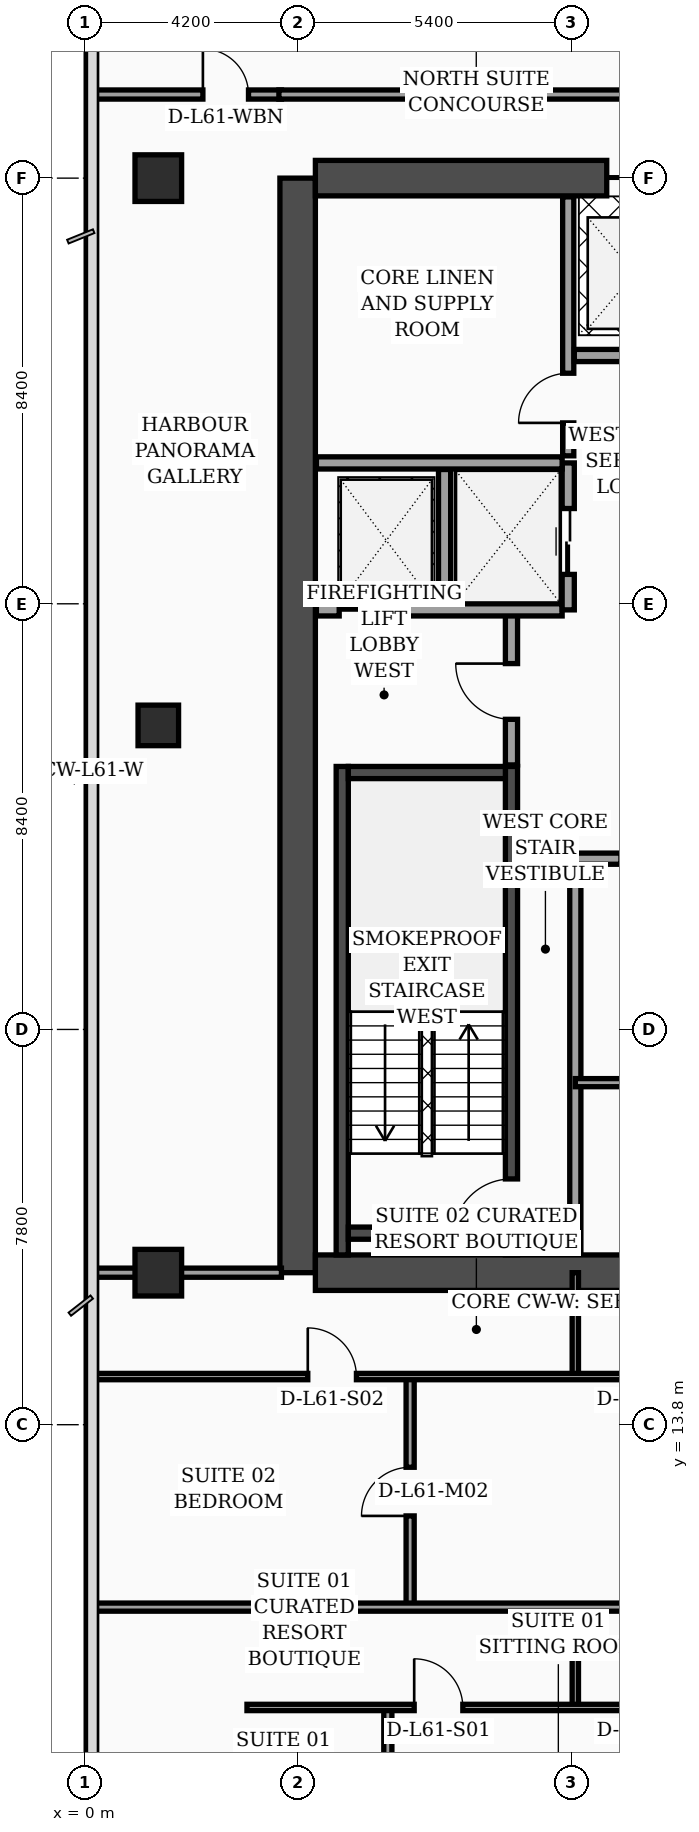
"""IFC4 building model, lengths in metres.
Left out: names, types, materials, properties, quantities, classifications, styles, units other than length and angle.
Written with IfcOpenShell. Run it as: python <this file> out.ifc"""

import sys

from ifc_helpers import new_model, si_unit, direction, frame, frame_2d, origin, origin_2d, place, context, subcontext, project, spatial, rectangle, extrude, element, fill, save


model = new_model("IFC4")
c1 = context("Model", 3, precision=1e-05, world=origin(), true_north=direction((0.0, 1.0)))
c2 = subcontext(c1, "Body", "Model", "MODEL_VIEW")
j1 = project(units=[si_unit("LENGTHUNIT", "METRE"), si_unit("PLANEANGLEUNIT", "RADIAN")], contexts=[c1])
p1 = place(None, origin())
s1 = spatial("IfcSite", under=j1, at=p1, CompositionType="ELEMENT")
p2 = place(p1, origin())
s2 = spatial("IfcBuilding", under=s1, at=p2, CompositionType="ELEMENT")
p3 = place(p2, frame((0.0, 0.0, 247.6)))
s3 = spatial("IfcBuildingStorey", under=s2, at=p3, CompositionType="ELEMENT", Elevation=247.6)
p4 = place(p3, frame((4.2, 16.8, 0.0), z_axis=(0.0, 0.0, 1.0), x_axis=(0.0, 1.0, 0.0)))
e1 = element("IfcWall", 1, at=p4, inside=s3, PredefinedType="SHEAR", context=c2, shape_type="SweptSolid", body=[
    extrude(rectangle(XDim=21.6, YDim=0.7, at=frame_2d((10.8, 0.0))), origin(), (0.0, 0.0, 1.0), 3.56),
])
p5 = place(p3, frame((4.55, 38.4, 0.0), z_axis=(0.0, 0.0, 1.0), x_axis=(1.0, 0.0, 0.0)))
e2 = element("IfcWall", 2, at=p5, inside=s3, PredefinedType="SHEAR", context=c2, shape_type="SweptSolid", body=[
    extrude(rectangle(XDim=10.1, YDim=0.7, at=frame_2d((5.05, 0.0))), origin(), (0.0, 0.0, 1.0), 3.56),
])
p6 = place(p5, frame((5.75, 0.0, 0.0)))
e3 = element("IfcOpeningElement", 3, at=p6, cuts=e2, PredefinedType="OPENING", context=c2, shape_type="SweptSolid", body=[
    extrude(rectangle(XDim=1.1, YDim=2.2, at=frame_2d((0.55, 1.1))), frame((0.0, 0.36, 0.0), z_axis=(0.0, -1.0, 0.0), x_axis=(1.0, 0.0, 0.0)), (0.0, 0.0, 1.0), 0.72),
])
p7 = place(p3, frame((4.55, 16.8, 0.0), z_axis=(0.0, 0.0, 1.0), x_axis=(1.0, 0.0, 0.0)))
e4 = element("IfcWall", 4, at=p7, inside=s3, PredefinedType="SHEAR", context=c2, shape_type="SweptSolid", body=[
    extrude(rectangle(XDim=10.1, YDim=0.7, at=frame_2d((5.05, 0.0))), origin(), (0.0, 0.0, 1.0), 3.56),
])
p8 = place(p3, frame((5.08, 17.15, 0.0), z_axis=(0.0, 0.0, 1.0), x_axis=(0.0, 1.0, 0.0)))
e5 = element("IfcWall", 5, at=p8, inside=s3, PredefinedType="SOLIDWALL", context=c2, shape_type="SweptSolid", body=[
    extrude(rectangle(XDim=9.64, YDim=0.24, at=frame_2d((4.82, 0.0))), origin(), (0.0, 0.0, 1.0), 3.56),
])
p9 = place(p3, frame((8.42, 17.15, 0.0), z_axis=(0.0, 0.0, 1.0), x_axis=(0.0, 1.0, 0.0)))
e6 = element("IfcWall", 6, at=p9, inside=s3, PredefinedType="SOLIDWALL", context=c2, shape_type="SweptSolid", body=[
    extrude(rectangle(XDim=9.64, YDim=0.24, at=frame_2d((4.82, 0.0))), origin(), (0.0, 0.0, 1.0), 3.56),
])
p10 = place(p9, frame((0.35, 0.0, 0.0)))
e7 = element("IfcOpeningElement", 7, at=p10, cuts=e6, PredefinedType="OPENING", context=c2, shape_type="SweptSolid", body=[
    extrude(rectangle(XDim=1.15, YDim=2.2, at=frame_2d((0.575, 1.1))), frame((0.0, 0.13, 0.0), z_axis=(0.0, -1.0, 0.0), x_axis=(1.0, 0.0, 0.0)), (0.0, 0.0, 1.0), 0.26),
])
for number, where, z_axis, x_axis in (
    (8, (5.2, 17.58, 0.0), (0.0, 0.0, 1.0), (1.0, 0.0, 0.0)),
    (9, (5.2, 26.67, 0.0), (0.0, 0.0, 1.0), (1.0, 0.0, 0.0)),
):
    element("IfcWall", number, at=place(p3, frame(where, z_axis=z_axis, x_axis=x_axis)), inside=s3, PredefinedType="SOLIDWALL", context=c2, shape_type="SweptSolid", body=[
        extrude(rectangle(XDim=3.1, YDim=0.24, at=frame_2d((1.55, 0.0))), origin(), (0.0, 0.0, 1.0), 3.56),
    ])
p11 = place(p3, frame((1.45, 16.8, 0.0), z_axis=(0.0, 0.0, 1.0), x_axis=(1.0, 0.0, 0.0)))
e10 = element("IfcColumn", 10, at=p11, inside=s3, PredefinedType="COLUMN", context=c2, shape_type="SweptSolid", body=[
    extrude(rectangle(XDim=0.92, YDim=0.92, at=origin_2d()), origin(), (0.0, 0.0, 1.0), 3.56),
])
p12 = place(p3, frame((1.45, 27.6, 0.0), z_axis=(0.0, 0.0, 1.0), x_axis=(1.0, 0.0, 0.0)))
e11 = element("IfcColumn", 11, at=p12, inside=s3, PredefinedType="COLUMN", context=c2, shape_type="SweptSolid", body=[
    extrude(rectangle(XDim=0.8, YDim=0.8, at=origin_2d()), origin(), (0.0, 0.0, 1.0), 3.56),
])
p13 = place(p3, frame((1.45, 38.4, 0.0), z_axis=(0.0, 0.0, 1.0), x_axis=(1.0, 0.0, 0.0)))
e12 = element("IfcColumn", 12, at=p13, inside=s3, PredefinedType="COLUMN", context=c2, shape_type="SweptSolid", body=[
    extrude(rectangle(XDim=0.92, YDim=0.92, at=origin_2d()), origin(), (0.0, 0.0, 1.0), 3.56),
])
p14 = place(p3, frame((8.42, 26.82, 0.0), z_axis=(0.0, 0.0, 1.0), x_axis=(0.0, 1.0, 0.0)))
e13 = element("IfcWall", 13, at=p14, inside=s3, PredefinedType="SOLIDWALL", context=c2, shape_type="SweptSolid", body=[
    extrude(rectangle(XDim=3.0, YDim=0.24, at=frame_2d((1.5, 0.0))), origin(), (0.0, 0.0, 1.0), 3.56),
])
p15 = place(p14, frame((0.9, 0.0, 0.0)))
e14 = element("IfcOpeningElement", 14, at=p15, cuts=e13, PredefinedType="OPENING", context=c2, shape_type="SweptSolid", body=[
    extrude(rectangle(XDim=1.1, YDim=2.2, at=frame_2d((0.55, 1.1))), frame((0.0, 0.13, 0.0), z_axis=(0.0, -1.0, 0.0), x_axis=(1.0, 0.0, 0.0)), (0.0, 0.0, 1.0), 0.26),
])
p16 = place(p3, frame((4.57, 29.88, 0.0), z_axis=(0.0, 0.0, 1.0), x_axis=(1.0, 0.0, 0.0)))
e15 = element("IfcWall", 15, at=p16, inside=s3, PredefinedType="SOLIDWALL", context=c2, shape_type="SweptSolid", body=[
    extrude(rectangle(XDim=4.85, YDim=0.24, at=frame_2d((2.425, 0.0))), origin(), (0.0, 0.0, 1.0), 3.56),
])
p17 = place(p16, frame((0.45, 0.0, 0.0)))
e16 = element("IfcOpeningElement", 16, at=p17, cuts=e15, PredefinedType="OPENING", context=c2, shape_type="SweptSolid", body=[
    extrude(rectangle(XDim=1.3, YDim=2.35, at=frame_2d((0.65, 1.175))), frame((0.0, 0.13, 0.0), z_axis=(0.0, -1.0, 0.0), x_axis=(1.0, 0.0, 0.0)), (0.0, 0.0, 1.0), 0.26),
])
p18 = place(p3, frame((7.1, 30.02, 0.0), z_axis=(0.0, 0.0, 1.0), x_axis=(0.0, 1.0, 0.0)))
e17 = element("IfcWall", 17, at=p18, inside=s3, PredefinedType="SOLIDWALL", context=c2, shape_type="SweptSolid", body=[
    extrude(rectangle(XDim=2.63, YDim=0.24, at=frame_2d((1.315, 0.0))), origin(), (0.0, 0.0, 1.0), 3.56),
])
p19 = place(p3, frame((9.54, 29.88, 0.0), z_axis=(0.0, 0.0, 1.0), x_axis=(0.0, 1.0, 0.0)))
e18 = element("IfcWall", 18, at=p19, inside=s3, PredefinedType="SOLIDWALL", context=c2, shape_type="SweptSolid", body=[
    extrude(rectangle(XDim=2.9, YDim=0.24, at=frame_2d((1.45, 0.0))), origin(), (0.0, 0.0, 1.0), 3.56),
])
p20 = place(p19, frame((0.7, 0.0, 0.0)))
e19 = element("IfcOpeningElement", 19, at=p20, cuts=e18, PredefinedType="OPENING", context=c2, shape_type="SweptSolid", body=[
    extrude(rectangle(XDim=1.3, YDim=2.35, at=frame_2d((0.65, 1.175))), frame((0.0, 0.13, 0.0), z_axis=(0.0, -1.0, 0.0), x_axis=(1.0, 0.0, 0.0)), (0.0, 0.0, 1.0), 0.26),
])
p21 = place(p3, frame((4.57, 32.78, 0.0), z_axis=(0.0, 0.0, 1.0), x_axis=(1.0, 0.0, 0.0)))
e20 = element("IfcWall", 20, at=p21, inside=s3, PredefinedType="SOLIDWALL", context=c2, shape_type="SweptSolid", body=[
    extrude(rectangle(XDim=4.85, YDim=0.24, at=frame_2d((2.425, 0.0))), origin(), (0.0, 0.0, 1.0), 3.19),
])
p22 = place(p3, frame((9.68, 17.17, 0.0), z_axis=(0.0, 0.0, 1.0), x_axis=(0.0, 1.0, 0.0)))
e21 = element("IfcWall", 21, at=p22, inside=s3, PredefinedType="SOLIDWALL", context=c2, shape_type="SweptSolid", body=[
    extrude(rectangle(XDim=7.83, YDim=0.22, at=frame_2d((3.915, 0.0))), origin(), (0.0, 0.0, 1.0), 3.56),
])
p23 = place(p3, frame((9.54, 32.92, 0.0), z_axis=(0.0, 0.0, 1.0), x_axis=(0.0, 1.0, 0.0)))
e22 = element("IfcWall", 22, at=p23, inside=s3, PredefinedType="SOLIDWALL", context=c2, shape_type="SweptSolid", body=[
    extrude(rectangle(XDim=5.11, YDim=0.22, at=frame_2d((2.555, 0.0))), origin(), (0.0, 0.0, 1.0), 3.56),
])
p24 = place(p23, frame((0.65, 0.0, 0.0)))
e23 = element("IfcOpeningElement", 23, at=p24, cuts=e22, PredefinedType="OPENING", context=c2, shape_type="SweptSolid", body=[
    extrude(rectangle(XDim=0.98, YDim=2.15, at=frame_2d((0.49, 1.075))), frame((0.0, 0.12, 0.0), z_axis=(0.0, -1.0, 0.0), x_axis=(1.0, 0.0, 0.0)), (0.0, 0.0, 1.0), 0.24),
])
p25 = place(p3, frame((9.68, 20.55, 0.0), z_axis=(0.0, 0.0, 1.0), x_axis=(1.0, 0.0, 0.0)))
e24 = element("IfcWall", 24, at=p25, inside=s3, PredefinedType="PARTITIONING", context=c2, shape_type="SweptSolid", body=[
    extrude(rectangle(XDim=4.95, YDim=0.16, at=frame_2d((2.475, 0.0))), origin(), (0.0, 0.0, 1.0), 3.56),
])
p26 = place(p25, frame((1.1, 0.0, 0.0)))
e25 = element("IfcOpeningElement", 25, at=p26, cuts=e24, PredefinedType="OPENING", context=c2, shape_type="SweptSolid", body=[
    extrude(rectangle(XDim=0.98, YDim=2.15, at=frame_2d((0.49, 1.075))), frame((0.0, 0.09, 0.0), z_axis=(0.0, -1.0, 0.0), x_axis=(1.0, 0.0, 0.0)), (0.0, 0.0, 1.0), 0.18),
])
p27 = place(p3, frame((9.68, 24.97, 0.0), z_axis=(0.0, 0.0, 1.0), x_axis=(1.0, 0.0, 0.0)))
e26 = element("IfcWall", 26, at=p27, inside=s3, PredefinedType="SOLIDWALL", context=c2, shape_type="SweptSolid", body=[
    extrude(rectangle(XDim=4.95, YDim=0.22, at=frame_2d((2.475, 0.0))), origin(), (0.0, 0.0, 1.0), 2.99),
])
p28 = place(p27, frame((0.9, 0.0, 0.0)))
e27 = element("IfcOpeningElement", 27, at=p28, cuts=e26, PredefinedType="OPENING", context=c2, shape_type="SweptSolid", body=[
    extrude(rectangle(XDim=0.98, YDim=2.15, at=frame_2d((0.49, 1.075))), frame((0.0, 0.12, 0.0), z_axis=(0.0, -1.0, 0.0), x_axis=(1.0, 0.0, 0.0)), (0.0, 0.0, 1.0), 0.24),
])
p29 = place(p3, frame((9.66, 34.9, 0.0), z_axis=(0.0, 0.0, 1.0), x_axis=(1.0, 0.0, 0.0)))
e28 = element("IfcWall", 28, at=p29, inside=s3, PredefinedType="SOLIDWALL", context=c2, shape_type="SweptSolid", body=[
    extrude(rectangle(XDim=4.97, YDim=0.24, at=frame_2d((2.485, 0.0))), origin(), (0.0, 0.0, 1.0), 3.56),
])
p30 = place(p3, frame((0.08, 16.8, 0.0), z_axis=(0.0, 0.0, 1.0), x_axis=(1.0, 0.0, 0.0)))
e29 = element("IfcWall", 29, at=p30, inside=s3, PredefinedType="PARTITIONING", context=c2, shape_type="SweptSolid", body=[
    extrude(rectangle(XDim=3.8, YDim=0.18, at=frame_2d((1.9, 0.0))), origin(), (0.0, 0.0, 1.0), 2.99),
])
p31 = place(p3, frame((0.08, 40.05, 0.0), z_axis=(0.0, 0.0, 1.0), x_axis=(1.0, 0.0, 0.0)))
e30 = element("IfcWall", 30, at=p31, inside=s3, PredefinedType="PARTITIONING", context=c2, shape_type="SweptSolid", body=[
    extrude(rectangle(XDim=3.8, YDim=0.18, at=frame_2d((1.9, 0.0))), origin(), (0.0, 0.0, 1.0), 2.99),
])
p32 = place(p31, frame((2.25, 0.0, 0.0)))
e31 = element("IfcOpeningElement", 31, at=p32, cuts=e30, PredefinedType="OPENING", context=c2, shape_type="SweptSolid", body=[
    extrude(rectangle(XDim=0.9, YDim=2.15, at=frame_2d((0.45, 1.075))), frame((0.0, 0.1, 0.0), z_axis=(0.0, -1.0, 0.0), x_axis=(1.0, 0.0, 0.0)), (0.0, 0.0, 1.0), 0.2),
])
p33 = place(p3, frame((9.68, 8.22, 0.0), z_axis=(0.0, 0.0, 1.0), x_axis=(0.0, 1.0, 0.0)))
e32 = element("IfcWall", 32, at=p33, inside=s3, PredefinedType="PARTITIONING", context=c2, shape_type="SweptSolid", body=[
    extrude(rectangle(XDim=1.98, YDim=0.125, at=frame_2d((0.99, 0.0))), origin(), (0.0, 0.0, 1.0), 3.09),
])
p34 = place(p3, frame((5.98, 2.44, 0.0), z_axis=(0.0, 0.0, 1.0), x_axis=(0.0, 1.0, 0.0)))
e33 = element("IfcWall", 33, at=p34, inside=s3, PredefinedType="PARTITIONING", context=c2, shape_type="SweptSolid", body=[
    extrude(rectangle(XDim=5.78, YDim=0.16, at=frame_2d((2.89, 0.0))), origin(), (0.0, 0.0, 1.0), 3.09),
])
p35 = place(p34, frame((2.41, 0.0, 0.0)))
e34 = element("IfcOpeningElement", 34, at=p35, cuts=e33, PredefinedType="OPENING", context=c2, shape_type="SweptSolid", body=[
    extrude(rectangle(XDim=0.96, YDim=2.2, at=frame_2d((0.48, 1.1))), frame((0.0, 0.09, 0.0), z_axis=(0.0, -1.0, 0.0), x_axis=(1.0, 0.0, 0.0)), (0.0, 0.0, 1.0), 0.18),
])
p36 = place(p3, frame((3.2, 8.22, 0.0), z_axis=(0.0, 0.0, 1.0), x_axis=(1.0, 0.0, 0.0)))
e35 = element("IfcWall", 35, at=p36, inside=s3, PredefinedType="PARTITIONING", context=c2, shape_type="SweptSolid", body=[
    extrude(rectangle(XDim=9.4, YDim=0.125, at=frame_2d((4.7, 0.0))), origin(), (0.0, 0.0, 1.0), 2.99),
])
p37 = place(p36, frame((3.3, 0.0, 0.0)))
e36 = element("IfcOpeningElement", 36, at=p37, cuts=e35, PredefinedType="OPENING", context=c2, shape_type="SweptSolid", body=[
    extrude(rectangle(XDim=0.96, YDim=2.2, at=frame_2d((0.48, 1.1))), frame((0.0, 0.073, 0.0), z_axis=(0.0, -1.0, 0.0), x_axis=(1.0, 0.0, 0.0)), (0.0, 0.0, 1.0), 0.145),
])
p38 = place(p36, frame((7.49, 0.0, 0.0)))
e37 = element("IfcOpeningElement", 37, at=p38, cuts=e35, PredefinedType="OPENING", context=c2, shape_type="SweptSolid", body=[
    extrude(rectangle(XDim=0.9, YDim=2.15, at=frame_2d((0.45, 1.075))), frame((0.0, 0.073, 0.0), z_axis=(0.0, -1.0, 0.0), x_axis=(1.0, 0.0, 0.0)), (0.0, 0.0, 1.0), 0.145),
])
p39 = place(p3, frame((9.68, 14.75, 0.0), z_axis=(0.0, 0.0, 1.0), x_axis=(0.0, 1.0, 0.0)))
e38 = element("IfcWall", 38, at=p39, inside=s3, PredefinedType="PARTITIONING", context=c2, shape_type="SweptSolid", body=[
    extrude(rectangle(XDim=2.05, YDim=0.125, at=frame_2d((1.025, 0.0))), origin(), (0.0, 0.0, 1.0), 3.56),
])
p40 = place(p3, frame((6.42, 10.2, 0.0), z_axis=(0.0, 0.0, 1.0), x_axis=(0.0, 1.0, 0.0)))
e39 = element("IfcWall", 39, at=p40, inside=s3, PredefinedType="PARTITIONING", context=c2, shape_type="SweptSolid", body=[
    extrude(rectangle(XDim=4.55, YDim=0.16, at=frame_2d((2.275, 0.0))), origin(), (0.0, 0.0, 1.0), 3.14),
])
p41 = place(p40, frame((1.8, 0.0, 0.0)))
e40 = element("IfcOpeningElement", 40, at=p41, cuts=e39, PredefinedType="OPENING", context=c2, shape_type="SweptSolid", body=[
    extrude(rectangle(XDim=0.96, YDim=2.2, at=frame_2d((0.48, 1.1))), frame((0.0, 0.09, 0.0), z_axis=(0.0, -1.0, 0.0), x_axis=(1.0, 0.0, 0.0)), (0.0, 0.0, 1.0), 0.18),
])
p42 = place(p3, frame((0.08, 14.75, 0.0), z_axis=(0.0, 0.0, 1.0), x_axis=(1.0, 0.0, 0.0)))
e41 = element("IfcWall", 41, at=p42, inside=s3, PredefinedType="PARTITIONING", context=c2, shape_type="SweptSolid", body=[
    extrude(rectangle(XDim=12.52, YDim=0.125, at=frame_2d((6.26, 0.0))), origin(), (0.0, 0.0, 1.0), 2.99),
])
p43 = place(p42, frame((4.32, 0.0, 0.0)))
e42 = element("IfcOpeningElement", 42, at=p43, cuts=e41, PredefinedType="OPENING", context=c2, shape_type="SweptSolid", body=[
    extrude(rectangle(XDim=0.96, YDim=2.2, at=frame_2d((0.48, 1.1))), frame((0.0, 0.073, 0.0), z_axis=(0.0, -1.0, 0.0), x_axis=(1.0, 0.0, 0.0)), (0.0, 0.0, 1.0), 0.145),
])
p44 = place(p42, frame((10.61, 0.0, 0.0)))
e43 = element("IfcOpeningElement", 43, at=p44, cuts=e41, PredefinedType="OPENING", context=c2, shape_type="SweptSolid", body=[
    extrude(rectangle(XDim=0.9, YDim=2.15, at=frame_2d((0.45, 1.075))), frame((0.0, 0.073, 0.0), z_axis=(0.0, -1.0, 0.0), x_axis=(1.0, 0.0, 0.0)), (0.0, 0.0, 1.0), 0.145),
])
p45 = place(p3, frame((0.08, 10.2, 0.0), z_axis=(0.0, 0.0, 1.0), x_axis=(1.0, 0.0, 0.0)))
e44 = element("IfcWall", 44, at=p45, inside=s3, PredefinedType="PARTITIONING", context=c2, shape_type="SweptSolid", body=[
    extrude(rectangle(XDim=12.52, YDim=0.16, at=frame_2d((6.26, 0.0))), origin(), (0.0, 0.0, 1.0), 2.99),
])
p46 = place(p3, frame((3.83, 40.05, 0.0), z_axis=(0.0, 0.0, 1.0), x_axis=(1.0, 0.0, 0.0)))
e45 = element("IfcWall", 45, at=p46, inside=s3, PredefinedType="PARTITIONING", context=c2, shape_type="SweptSolid", body=[
    extrude(rectangle(XDim=11.32, YDim=0.18, at=frame_2d((5.66, 0.0))), origin(), (0.0, 0.0, 1.0), 2.99),
])
p47 = place(p15, origin())
e46 = element("IfcDoor", 46, at=p47, inside=s3, OperationType="SINGLE_SWING_RIGHT", PredefinedType="DOOR", context=c2, shape_type="SweptSolid", body=[
    extrude(rectangle(XDim=1.1, YDim=2.2, at=frame_2d((0.55, 1.1))), frame((0.0, 0.025, 0.0), z_axis=(0.0, -1.0, 0.0), x_axis=(1.0, 0.0, 0.0)), (0.0, 0.0, 1.0), 0.05),
])
fill(e14, e46)
p48 = place(p17, origin())
e47 = element("IfcDoor", 47, at=p48, inside=s3, OperationType="DOUBLE_DOOR_SLIDING", PredefinedType="DOOR", context=c2, shape_type="SweptSolid", body=[
    extrude(rectangle(XDim=1.3, YDim=2.35, at=frame_2d((0.65, 1.175))), frame((0.0, 0.025, 0.0), z_axis=(0.0, -1.0, 0.0), x_axis=(1.0, 0.0, 0.0)), (0.0, 0.0, 1.0), 0.05),
])
fill(e16, e47)
p49 = place(p20, origin())
e48 = element("IfcDoor", 48, at=p49, inside=s3, OperationType="DOUBLE_DOOR_SLIDING", PredefinedType="DOOR", context=c2, shape_type="SweptSolid", body=[
    extrude(rectangle(XDim=1.3, YDim=2.35, at=frame_2d((0.65, 1.175))), frame((0.0, 0.025, 0.0), z_axis=(0.0, -1.0, 0.0), x_axis=(1.0, 0.0, 0.0)), (0.0, 0.0, 1.0), 0.05),
])
fill(e19, e48)
p50 = place(p24, origin())
e49 = element("IfcDoor", 49, at=p50, inside=s3, OperationType="SINGLE_SWING_LEFT", PredefinedType="DOOR", context=c2, shape_type="SweptSolid", body=[
    extrude(rectangle(XDim=0.98, YDim=2.15, at=frame_2d((0.49, 1.075))), frame((0.0, 0.025, 0.0), z_axis=(0.0, -1.0, 0.0), x_axis=(1.0, 0.0, 0.0)), (0.0, 0.0, 1.0), 0.05),
])
fill(e23, e49)
p51 = place(p32, origin())
e50 = element("IfcDoor", 50, at=p51, inside=s3, OperationType="SINGLE_SWING_LEFT", PredefinedType="DOOR", context=c2, shape_type="SweptSolid", body=[
    extrude(rectangle(XDim=0.9, YDim=2.15, at=frame_2d((0.45, 1.075))), frame((0.0, 0.025, 0.0), z_axis=(0.0, -1.0, 0.0), x_axis=(1.0, 0.0, 0.0)), (0.0, 0.0, 1.0), 0.05),
])
fill(e31, e50)
p52 = place(p37, origin())
e51 = element("IfcDoor", 51, at=p52, inside=s3, OperationType="SINGLE_SWING_LEFT", PredefinedType="DOOR", context=c2, shape_type="SweptSolid", body=[
    extrude(rectangle(XDim=0.96, YDim=2.2, at=frame_2d((0.48, 1.1))), frame((0.0, 0.025, 0.0), z_axis=(0.0, -1.0, 0.0), x_axis=(1.0, 0.0, 0.0)), (0.0, 0.0, 1.0), 0.05),
])
fill(e36, e51)
p53 = place(p41, origin())
e52 = element("IfcDoor", 52, at=p53, inside=s3, OperationType="SINGLE_SWING_LEFT", PredefinedType="DOOR", context=c2, shape_type="SweptSolid", body=[
    extrude(rectangle(XDim=0.96, YDim=2.2, at=frame_2d((0.48, 1.1))), frame((0.0, 0.025, 0.0), z_axis=(0.0, -1.0, 0.0), x_axis=(1.0, 0.0, 0.0)), (0.0, 0.0, 1.0), 0.05),
])
fill(e40, e52)
p54 = place(p43, origin())
e53 = element("IfcDoor", 53, at=p54, inside=s3, OperationType="SINGLE_SWING_LEFT", PredefinedType="DOOR", context=c2, shape_type="SweptSolid", body=[
    extrude(rectangle(XDim=0.96, YDim=2.2, at=frame_2d((0.48, 1.1))), frame((0.0, 0.025, 0.0), z_axis=(0.0, -1.0, 0.0), x_axis=(1.0, 0.0, 0.0)), (0.0, 0.0, 1.0), 0.05),
])
fill(e42, e53)
p55 = place(p10, origin())
e54 = element("IfcDoor", 54, at=p55, inside=s3, OperationType="SINGLE_SWING_LEFT", PredefinedType="DOOR", context=c2, shape_type="SweptSolid", body=[
    extrude(rectangle(XDim=1.15, YDim=2.2, at=frame_2d((0.575, 1.1))), frame((0.0, 0.025, 0.0), z_axis=(0.0, -1.0, 0.0), x_axis=(1.0, 0.0, 0.0)), (0.0, 0.0, 1.0), 0.05),
])
fill(e7, e54)
p56 = place(p6, origin())
e55 = element("IfcDoor", 55, at=p56, inside=s3, OperationType="DOUBLE_DOOR_SLIDING", PredefinedType="DOOR", context=c2, shape_type="SweptSolid", body=[
    extrude(rectangle(XDim=1.1, YDim=2.2, at=frame_2d((0.55, 1.1))), frame((0.0, 0.025, 0.0), z_axis=(0.0, -1.0, 0.0), x_axis=(1.0, 0.0, 0.0)), (0.0, 0.0, 1.0), 0.05),
])
fill(e3, e55)
save(model, sys.argv[1])
